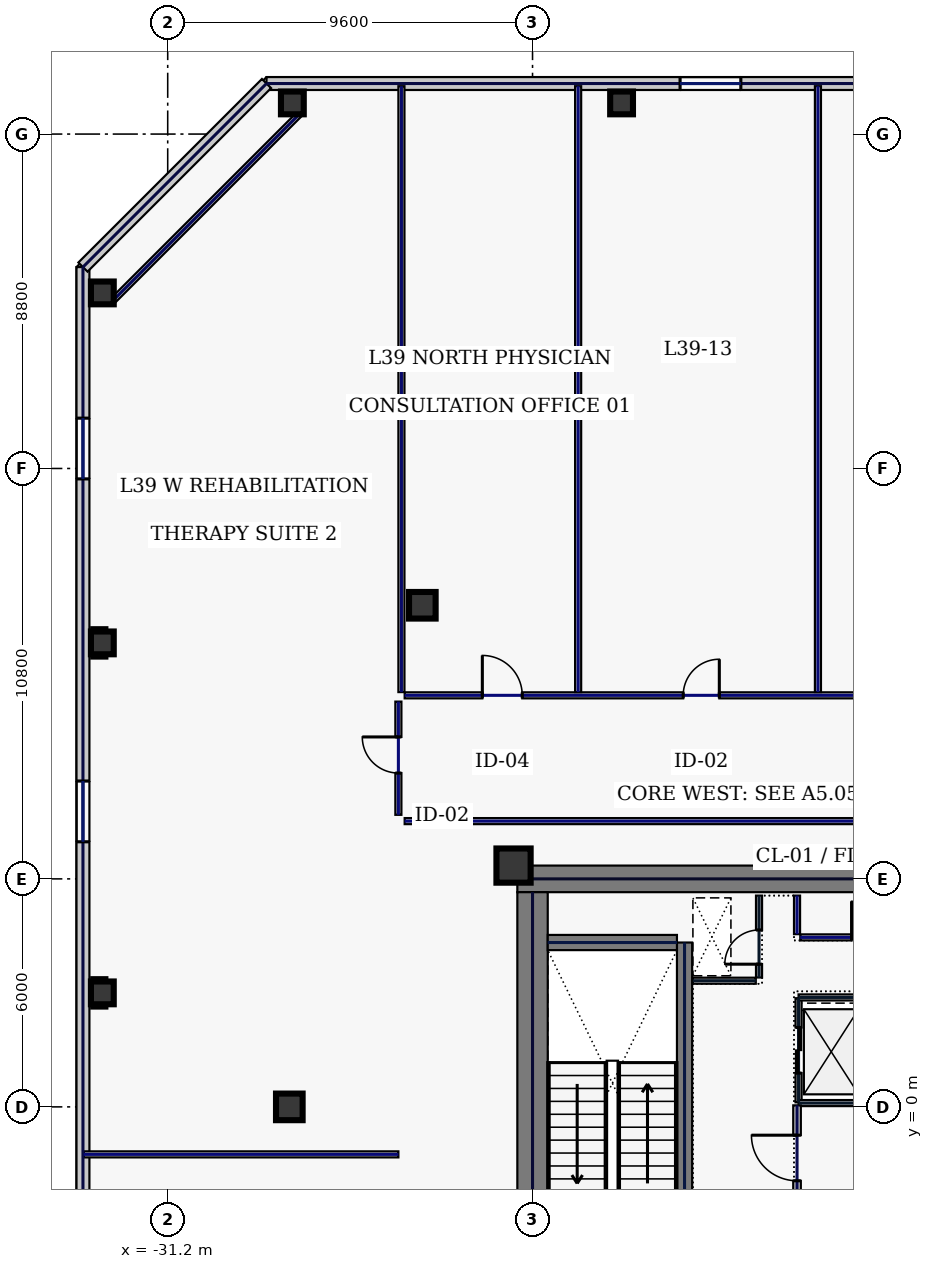
"""IFC4 building model, lengths in metres.
Left out: names, types, materials, properties, quantities, classifications, styles, units other than length and angle.
Written with IfcOpenShell. Run it as: python <this file> out.ifc"""

import sys

from ifc_helpers import new_model, si_unit, direction, frame, frame_2d, origin, origin_2d, place, context, subcontext, project, spatial, rectangle, hollow_rectangle, extrude, element, fill, save


model = new_model("IFC4")
c1 = context("Model", 3, precision=1e-05, world=origin(), true_north=direction((0.0, 1.0)))
c2 = subcontext(c1, "Body", "Model", "MODEL_VIEW")
j1 = project(units=[si_unit("LENGTHUNIT", "METRE"), si_unit("PLANEANGLEUNIT", "RADIAN")], contexts=[c1])
p1 = place(None, origin())
s1 = spatial("IfcSite", under=j1, at=p1, CompositionType="ELEMENT")
p2 = place(p1, origin())
s2 = spatial("IfcBuilding", under=s1, at=p2, CompositionType="ELEMENT")
p3 = place(p2, frame((0.0, 0.0, 172.2)))
s3 = spatial("IfcBuildingStorey", under=s2, at=p3, CompositionType="ELEMENT", Elevation=172.2)
p4 = place(p3, frame((-22.0, 6.0, 0.0), z_axis=(0.0, 0.0, 1.0), x_axis=(1.0, 0.0, 0.0)))
e1 = element("IfcWall", 1, at=p4, inside=s3, PredefinedType="SHEAR", context=c2, shape_type="SweptSolid", body=[
    extrude(rectangle(XDim=11.55, YDim=0.7, at=frame_2d((5.775, 0.0))), origin(), (0.0, 0.0, 1.0), 3.74),
])
p5 = place(p3, frame((-21.6, -5.65, 0.0), z_axis=(0.0, 0.0, 1.0), x_axis=(0.0, 1.0, 0.0)))
e2 = element("IfcWall", 2, at=p5, inside=s3, PredefinedType="SHEAR", context=c2, shape_type="SweptSolid", body=[
    extrude(rectangle(XDim=11.3, YDim=0.8, at=frame_2d((5.65, 0.0))), origin(), (0.0, 0.0, 1.0), 3.74),
])
p6 = place(p3, frame((-17.6, -4.325, 0.0), z_axis=(0.0, 0.0, 1.0), x_axis=(0.0, 1.0, 0.0)))
e3 = element("IfcWall", 3, at=p6, inside=s3, PredefinedType="SHEAR", context=c2, shape_type="SweptSolid", body=[
    extrude(rectangle(XDim=8.65, YDim=0.4, at=frame_2d((4.325, 0.0))), origin(), (0.0, 0.0, 1.0), 3.74),
])
p7 = place(p6, frame((0.25, 0.0, 0.0)))
e4 = element("IfcOpeningElement", 4, at=p7, cuts=e3, PredefinedType="OPENING", context=c2, shape_type="SweptSolid", body=[
    extrude(rectangle(XDim=1.1, YDim=2.2, at=frame_2d((0.55, 1.1))), frame((0.0, 0.21, 0.0), z_axis=(0.0, -1.0, 0.0), x_axis=(1.0, 0.0, 0.0)), (0.0, 0.0, 1.0), 0.42),
])
p8 = place(p3, frame((-21.2, 4.325, 0.0), z_axis=(0.0, 0.0, 1.0), x_axis=(1.0, 0.0, 0.0)))
e5 = element("IfcWall", 5, at=p8, inside=s3, PredefinedType="SHEAR", context=c2, shape_type="SweptSolid", body=[
    extrude(rectangle(XDim=3.4, YDim=0.4, at=frame_2d((1.7, 0.0))), origin(), (0.0, 0.0, 1.0), 3.74),
])
p9 = place(p3, frame((-22.1, 6.35, 0.0), z_axis=(0.0, 0.0, 1.0), x_axis=(1.0, 0.0, 0.0)))
e6 = element("IfcColumn", 6, at=p9, inside=s3, PredefinedType="COLUMN", context=c2, shape_type="SweptSolid", body=[
    extrude(hollow_rectangle(XDim=0.9, YDim=0.9, WallThickness=0.04, at=origin_2d()), origin(), (0.0, 0.0, 1.0), 3.74),
])
for number, where, z_axis, x_axis in (
    (7, (-24.5, 13.2, 0.0), (0.0, 0.0, 1.0), (1.0, 0.0, 0.0)),
    (8, (-28.0, 0.0, 0.0), (0.0, 0.0, 1.0), (1.0, 0.0, 0.0)),
):
    element("IfcColumn", number, at=place(p3, frame(where, z_axis=z_axis, x_axis=x_axis)), inside=s3, PredefinedType="COLUMN", context=c2, shape_type="SweptSolid", body=[
        extrude(hollow_rectangle(XDim=0.7, YDim=0.7, WallThickness=0.032, at=origin_2d()), origin(), (0.0, 0.0, 1.0), 3.74),
    ])
for number, where, z_axis, x_axis in (
    (9, (-19.257, 26.42, 0.0), (0.0, 0.0, 1.0), (1.0, 0.0, 0.0)),
    (10, (-27.92, 26.42, 0.0), (0.0, 0.0, 1.0), (1.0, 0.0, 0.0)),
    (11, (-32.92, 21.42, 0.0), (0.0, 0.0, 1.0), (1.0, 0.0, 0.0)),
    (12, (-32.92, 12.21, 0.0), (0.0, 0.0, 1.0), (1.0, 0.0, 0.0)),
    (13, (-32.92, 3.0, 0.0), (0.0, 0.0, 1.0), (1.0, 0.0, 0.0)),
):
    element("IfcColumn", number, at=place(p3, frame(where, z_axis=z_axis, x_axis=x_axis)), inside=s3, PredefinedType="COLUMN", context=c2, shape_type="SweptSolid", body=[
        extrude(hollow_rectangle(XDim=0.6, YDim=0.6, WallThickness=0.028, at=origin_2d()), origin(), (0.0, 0.0, 1.0), 3.74),
    ])
p10 = place(p3, frame((-8.663, 26.93, 0.0), z_axis=(0.0, 0.0, 1.0), x_axis=(-1.0, 0.0, 0.0)))
e14 = element("IfcWall", 14, at=p10, inside=s3, PredefinedType="STANDARD", context=c2, shape_type="SweptSolid", body=[
    extrude(rectangle(XDim=19.937, YDim=0.34, at=frame_2d((9.969, 0.0))), origin(), (0.0, 0.0, 1.0), 3.74),
])
p11 = place(p10, frame((7.455, 0.0, 0.22)))
e15 = element("IfcOpeningElement", 15, at=p11, cuts=e14, PredefinedType="OPENING", context=c2, shape_type="SweptSolid", body=[
    extrude(rectangle(XDim=1.6, YDim=1.2, at=frame_2d((0.8, 0.6))), frame((0.0, 0.18, 0.0), z_axis=(0.0, -1.0, 0.0), x_axis=(1.0, 0.0, 0.0)), (0.0, 0.0, 1.0), 0.36),
])
p12 = place(p3, frame((-33.43, 22.1, 0.0), z_axis=(0.0, 0.0, 1.0), x_axis=(0.0, -1.0, 0.0)))
e16 = element("IfcWall", 16, at=p12, inside=s3, PredefinedType="STANDARD", context=c2, shape_type="SweptSolid", body=[
    extrude(rectangle(XDim=38.2, YDim=0.34, at=frame_2d((19.1, 0.0))), origin(), (0.0, 0.0, 1.0), 3.74),
])
p13 = place(p12, frame((3.975, 0.0, 0.22)))
e17 = element("IfcOpeningElement", 17, at=p13, cuts=e16, PredefinedType="OPENING", context=c2, shape_type="SweptSolid", body=[
    extrude(rectangle(XDim=1.6, YDim=1.2, at=frame_2d((0.8, 0.6))), frame((0.0, 0.18, 0.0), z_axis=(0.0, -1.0, 0.0), x_axis=(1.0, 0.0, 0.0)), (0.0, 0.0, 1.0), 0.36),
])
p14 = place(p12, frame((13.525, 0.0, 0.22)))
e18 = element("IfcOpeningElement", 18, at=p14, cuts=e16, PredefinedType="OPENING", context=c2, shape_type="SweptSolid", body=[
    extrude(rectangle(XDim=1.6, YDim=1.2, at=frame_2d((0.8, 0.6))), frame((0.0, 0.18, 0.0), z_axis=(0.0, -1.0, 0.0), x_axis=(1.0, 0.0, 0.0)), (0.0, 0.0, 1.0), 0.36),
])
p15 = place(p12, frame((32.625, 0.0, 0.22)))
e19 = element("IfcOpeningElement", 19, at=p15, cuts=e16, PredefinedType="OPENING", context=c2, shape_type="SweptSolid", body=[
    extrude(rectangle(XDim=1.6, YDim=1.2, at=frame_2d((0.8, 0.6))), frame((0.0, 0.18, 0.0), z_axis=(0.0, -1.0, 0.0), x_axis=(1.0, 0.0, 0.0)), (0.0, 0.0, 1.0), 0.36),
])
p16 = place(p3, frame((-28.6, 26.93, 0.0), z_axis=(0.0, 0.0, 1.0), x_axis=(-0.707106781187, -0.707106781187, 0.0)))
e20 = element("IfcWall", 20, at=p16, inside=s3, PredefinedType="STANDARD", context=c2, shape_type="SweptSolid", body=[
    extrude(rectangle(XDim=6.83, YDim=0.34, at=frame_2d((3.415, 0.0))), origin(), (0.0, 0.0, 1.0), 3.74),
])
p17 = place(p3, frame((-14.6, 0.12, 0.0), z_axis=(0.0, 0.0, 1.0), x_axis=(0.0, 1.0, 0.0)))
e21 = element("IfcWall", 21, at=p17, inside=s3, PredefinedType="PARTITIONING", context=c2, shape_type="SweptSolid", body=[
    extrude(rectangle(XDim=2.74, YDim=0.16, at=frame_2d((1.37, 0.0))), origin(), (0.0, 0.0, 1.0), 3.74),
])
p18 = place(p17, frame((0.77, 0.0, 0.0)))
e22 = element("IfcOpeningElement", 22, at=p18, cuts=e21, PredefinedType="OPENING", context=c2, shape_type="SweptSolid", body=[
    extrude(rectangle(XDim=1.2, YDim=2.2, at=frame_2d((0.6, 1.1))), frame((0.0, 0.09, 0.0), z_axis=(0.0, -1.0, 0.0), x_axis=(1.0, 0.0, 0.0)), (0.0, 0.0, 1.0), 0.18),
])
for number, where, z_axis, x_axis in (
    (23, (-14.6, 0.1, 0.0), (0.0, 0.0, 1.0), (1.0, 0.0, 0.0)),
    (24, (-14.6, 2.88, 0.0), (0.0, 0.0, 1.0), (1.0, 0.0, 0.0)),
):
    element("IfcWall", number, at=place(p3, frame(where, z_axis=z_axis, x_axis=x_axis)), inside=s3, PredefinedType="PARTITIONING", context=c2, shape_type="SweptSolid", body=[
        extrude(rectangle(XDim=1.76, YDim=0.16, at=frame_2d((0.88, 0.0))), origin(), (0.0, 0.0, 1.0), 3.74),
    ])
p19 = place(p3, frame((-15.64, 3.405, 0.0), z_axis=(0.0, 0.0, 1.0), x_axis=(0.0, 1.0, 0.0)))
e25 = element("IfcWall", 25, at=p19, inside=s3, PredefinedType="PARTITIONING", context=c2, shape_type="SweptSolid", body=[
    extrude(rectangle(XDim=2.155, YDim=0.16, at=frame_2d((1.078, 0.0))), origin(), (0.0, 0.0, 1.0), 3.74),
])
p20 = place(p19, frame((0.35, 0.0, 0.0)))
e26 = element("IfcOpeningElement", 26, at=p20, cuts=e25, PredefinedType="OPENING", context=c2, shape_type="SweptSolid", body=[
    extrude(rectangle(XDim=0.9, YDim=2.2, at=frame_2d((0.45, 1.1))), frame((0.0, 0.09, 0.0), z_axis=(0.0, -1.0, 0.0), x_axis=(1.0, 0.0, 0.0)), (0.0, 0.0, 1.0), 0.18),
])
p21 = place(p3, frame((-17.38, 3.32, 0.0), z_axis=(0.0, 0.0, 1.0), x_axis=(1.0, 0.0, 0.0)))
e27 = element("IfcWall", 27, at=p21, inside=s3, PredefinedType="PARTITIONING", context=c2, shape_type="SweptSolid", body=[
    extrude(rectangle(XDim=1.655, YDim=0.16, at=frame_2d((0.827, 0.0))), origin(), (0.0, 0.0, 1.0), 3.74),
])
p22 = place(p3, frame((-14.555, 4.46, 0.0), z_axis=(0.0, 0.0, 1.0), x_axis=(1.0, 0.0, 0.0)))
e28 = element("IfcWall", 28, at=p22, inside=s3, PredefinedType="PARTITIONING", context=c2, shape_type="SweptSolid", body=[
    extrude(rectangle(XDim=3.755, YDim=0.16, at=frame_2d((1.877, 0.0))), origin(), (0.0, 0.0, 1.0), 3.74),
])
p23 = place(p22, frame((1.35, 0.0, 0.0)))
e29 = element("IfcOpeningElement", 29, at=p23, cuts=e28, PredefinedType="OPENING", context=c2, shape_type="SweptSolid", body=[
    extrude(rectangle(XDim=0.95, YDim=2.2, at=frame_2d((0.475, 1.1))), frame((0.0, 0.09, 0.0), z_axis=(0.0, -1.0, 0.0), x_axis=(1.0, 0.0, 0.0)), (0.0, 0.0, 1.0), 0.18),
])
p24 = place(p3, frame((-14.64, 4.545, 0.0), z_axis=(0.0, 0.0, 1.0), x_axis=(0.0, 1.0, 0.0)))
e30 = element("IfcWall", 30, at=p24, inside=s3, PredefinedType="PARTITIONING", context=c2, shape_type="SweptSolid", body=[
    extrude(rectangle(XDim=1.015, YDim=0.16, at=frame_2d((0.508, 0.0))), origin(), (0.0, 0.0, 1.0), 3.74),
])
p25 = place(p3, frame((-14.64, -4.035, 0.0), z_axis=(0.0, 0.0, 1.0), x_axis=(0.0, 1.0, 0.0)))
e31 = element("IfcWall", 31, at=p25, inside=s3, PredefinedType="SOLIDWALL", context=c2, shape_type="SweptSolid", body=[
    extrude(rectangle(XDim=4.075, YDim=0.2, at=frame_2d((2.038, 0.0))), origin(), (0.0, 0.0, 1.0), 3.74),
])
p26 = place(p25, frame((2.09, 0.0, 0.0)))
e32 = element("IfcOpeningElement", 32, at=p26, cuts=e31, PredefinedType="OPENING", context=c2, shape_type="SweptSolid", body=[
    extrude(rectangle(XDim=1.2, YDim=2.2, at=frame_2d((0.6, 1.1))), frame((0.0, 0.11, 0.0), z_axis=(0.0, -1.0, 0.0), x_axis=(1.0, 0.0, 0.0)), (0.0, 0.0, 1.0), 0.22),
])
p27 = place(p3, frame((-27.68, 26.18, 0.0), z_axis=(0.0, 0.0, 1.0), x_axis=(-0.707106781187, -0.707106781187, 0.0)))
e33 = element("IfcWall", 33, at=p27, inside=s3, PredefinedType="PARTITIONING", context=c2, shape_type="SweptSolid", body=[
    extrude(rectangle(XDim=7.071, YDim=0.16, at=frame_2d((3.536, 0.0))), origin(), (0.0, 0.0, 1.0), 1.535),
])
p28 = place(p3, frame((-10.715, 7.52, 0.0), z_axis=(0.0, 0.0, 1.0), x_axis=(-1.0, 0.0, 0.0)))
e34 = element("IfcWall", 34, at=p28, inside=s3, PredefinedType="PARTITIONING", context=c2, shape_type="SweptSolid", body=[
    extrude(rectangle(XDim=14.25, YDim=0.16, at=frame_2d((7.125, 0.0))), origin(), (0.0, 0.0, 1.0), 3.74),
])
p29 = place(p3, frame((-25.13, 7.685, 0.0), z_axis=(0.0, 0.0, 1.0), x_axis=(0.0, 1.0, 0.0)))
e35 = element("IfcWall", 35, at=p29, inside=s3, PredefinedType="PARTITIONING", context=c2, shape_type="SweptSolid", body=[
    extrude(rectangle(XDim=2.98, YDim=0.16, at=frame_2d((1.49, 0.0))), origin(), (0.0, 0.0, 1.0), 3.74),
])
p30 = place(p29, frame((1.1, 0.0, 0.0)))
e36 = element("IfcOpeningElement", 36, at=p30, cuts=e35, PredefinedType="OPENING", context=c2, shape_type="SweptSolid", body=[
    extrude(rectangle(XDim=0.95, YDim=2.2, at=frame_2d((0.475, 1.1))), frame((0.0, 0.09, 0.0), z_axis=(0.0, -1.0, 0.0), x_axis=(1.0, 0.0, 0.0)), (0.0, 0.0, 1.0), 0.18),
])
p31 = place(p3, frame((-24.965, 10.83, 0.0), z_axis=(0.0, 0.0, 1.0), x_axis=(1.0, 0.0, 0.0)))
e37 = element("IfcWall", 37, at=p31, inside=s3, PredefinedType="PARTITIONING", context=c2, shape_type="SweptSolid", body=[
    extrude(rectangle(XDim=49.93, YDim=0.16, at=frame_2d((24.965, 0.0))), origin(), (0.0, 0.0, 1.0), 3.74),
])
p32 = place(p31, frame((2.044, 0.0, 0.0)))
e38 = element("IfcOpeningElement", 38, at=p32, cuts=e37, PredefinedType="OPENING", context=c2, shape_type="SweptSolid", body=[
    extrude(rectangle(XDim=1.05, YDim=2.2, at=frame_2d((0.525, 1.1))), frame((0.0, 0.09, 0.0), z_axis=(0.0, -1.0, 0.0), x_axis=(1.0, 0.0, 0.0)), (0.0, 0.0, 1.0), 0.18),
])
p33 = place(p31, frame((7.33, 0.0, 0.0)))
e39 = element("IfcOpeningElement", 39, at=p33, cuts=e37, PredefinedType="OPENING", context=c2, shape_type="SweptSolid", body=[
    extrude(rectangle(XDim=0.95, YDim=2.2, at=frame_2d((0.475, 1.1))), frame((0.0, 0.09, 0.0), z_axis=(0.0, -1.0, 0.0), x_axis=(1.0, 0.0, 0.0)), (0.0, 0.0, 1.0), 0.18),
])
p34 = place(p31, frame((12.43, 0.0, 0.0)))
e40 = element("IfcOpeningElement", 40, at=p34, cuts=e37, PredefinedType="OPENING", context=c2, shape_type="SweptSolid", body=[
    extrude(rectangle(XDim=0.95, YDim=2.2, at=frame_2d((0.475, 1.1))), frame((0.0, 0.09, 0.0), z_axis=(0.0, -1.0, 0.0), x_axis=(1.0, 0.0, 0.0)), (0.0, 0.0, 1.0), 0.18),
])
p35 = place(p31, frame((18.875, 0.0, 0.0)))
e41 = element("IfcOpeningElement", 41, at=p35, cuts=e37, PredefinedType="OPENING", context=c2, shape_type="SweptSolid", body=[
    extrude(rectangle(XDim=1.3, YDim=2.2, at=frame_2d((0.65, 1.1))), frame((0.0, 0.09, 0.0), z_axis=(0.0, -1.0, 0.0), x_axis=(1.0, 0.0, 0.0)), (0.0, 0.0, 1.0), 0.18),
])
p36 = place(p31, frame((27.225, 0.0, 0.0)))
e42 = element("IfcOpeningElement", 42, at=p36, cuts=e37, PredefinedType="OPENING", context=c2, shape_type="SweptSolid", body=[
    extrude(rectangle(XDim=0.95, YDim=2.2, at=frame_2d((0.475, 1.1))), frame((0.0, 0.09, 0.0), z_axis=(0.0, -1.0, 0.0), x_axis=(1.0, 0.0, 0.0)), (0.0, 0.0, 1.0), 0.18),
])
p37 = place(p31, frame((33.153, 0.0, 0.0)))
e43 = element("IfcOpeningElement", 43, at=p37, cuts=e37, PredefinedType="OPENING", context=c2, shape_type="SweptSolid", body=[
    extrude(rectangle(XDim=1.05, YDim=2.2, at=frame_2d((0.525, 1.1))), frame((0.0, 0.09, 0.0), z_axis=(0.0, -1.0, 0.0), x_axis=(1.0, 0.0, 0.0)), (0.0, 0.0, 1.0), 0.18),
])
p38 = place(p31, frame((38.637, 0.0, 0.0)))
e44 = element("IfcOpeningElement", 44, at=p38, cuts=e37, PredefinedType="OPENING", context=c2, shape_type="SweptSolid", body=[
    extrude(rectangle(XDim=1.15, YDim=2.2, at=frame_2d((0.575, 1.1))), frame((0.0, 0.09, 0.0), z_axis=(0.0, -1.0, 0.0), x_axis=(1.0, 0.0, 0.0)), (0.0, 0.0, 1.0), 0.18),
])
p39 = place(p31, frame((42.8, 0.0, 0.0)))
e45 = element("IfcOpeningElement", 45, at=p39, cuts=e37, PredefinedType="OPENING", context=c2, shape_type="SweptSolid", body=[
    extrude(rectangle(XDim=1.3, YDim=2.2, at=frame_2d((0.65, 1.1))), frame((0.0, 0.09, 0.0), z_axis=(0.0, -1.0, 0.0), x_axis=(1.0, 0.0, 0.0)), (0.0, 0.0, 1.0), 0.18),
])
p40 = place(p31, frame((47.106, 0.0, 0.0)))
e46 = element("IfcOpeningElement", 46, at=p40, cuts=e37, PredefinedType="OPENING", context=c2, shape_type="SweptSolid", body=[
    extrude(rectangle(XDim=0.95, YDim=2.2, at=frame_2d((0.475, 1.1))), frame((0.0, 0.09, 0.0), z_axis=(0.0, -1.0, 0.0), x_axis=(1.0, 0.0, 0.0)), (0.0, 0.0, 1.0), 0.18),
])
p41 = place(p3, frame((-25.05, 10.915, 0.0), z_axis=(0.0, 0.0, 1.0), x_axis=(0.0, 1.0, 0.0)))
e47 = element("IfcWall", 47, at=p41, inside=s3, PredefinedType="PARTITIONING", context=c2, shape_type="SweptSolid", body=[
    extrude(rectangle(XDim=15.945, YDim=0.16, at=frame_2d((7.973, 0.0))), origin(), (0.0, 0.0, 1.0), 3.285),
])
for number, where, z_axis, x_axis in (
    (48, (-20.4, 10.915, 0.0), (0.0, 0.0, 1.0), (0.0, 1.0, 0.0)),
    (49, (-14.09, 10.915, 0.0), (0.0, 0.0, 1.0), (0.0, 1.0, 0.0)),
):
    element("IfcWall", number, at=place(p3, frame(where, z_axis=z_axis, x_axis=x_axis)), inside=s3, PredefinedType="PARTITIONING", context=c2, shape_type="SweptSolid", body=[
        extrude(rectangle(XDim=15.945, YDim=0.16, at=frame_2d((7.973, 0.0))), origin(), (0.0, 0.0, 1.0), 3.74),
    ])
p42 = place(p3, frame((-33.41, -1.25, 0.0), z_axis=(0.0, 0.0, 1.0), x_axis=(1.0, 0.0, 0.0)))
e50 = element("IfcWall", 50, at=p42, inside=s3, PredefinedType="PARTITIONING", context=c2, shape_type="SweptSolid", body=[
    extrude(rectangle(XDim=8.28, YDim=0.16, at=frame_2d((4.14, 0.0))), origin(), (0.0, 0.0, 1.0), 3.74),
])
p43 = place(p11, origin())
e51 = element("IfcWindow", 51, at=p43, inside=s3, PartitioningType="SINGLE_PANEL", PredefinedType="WINDOW", context=c2, shape_type="SweptSolid", body=[
    extrude(rectangle(XDim=1.6, YDim=1.2, at=frame_2d((0.8, 0.6))), frame((0.0, 0.03, 0.0), z_axis=(0.0, -1.0, 0.0), x_axis=(1.0, 0.0, 0.0)), (0.0, 0.0, 1.0), 0.06),
])
fill(e15, e51)
p44 = place(p13, origin())
e52 = element("IfcWindow", 52, at=p44, inside=s3, PartitioningType="SINGLE_PANEL", PredefinedType="WINDOW", context=c2, shape_type="SweptSolid", body=[
    extrude(rectangle(XDim=1.6, YDim=1.2, at=frame_2d((0.8, 0.6))), frame((0.0, 0.03, 0.0), z_axis=(0.0, -1.0, 0.0), x_axis=(1.0, 0.0, 0.0)), (0.0, 0.0, 1.0), 0.06),
])
fill(e17, e52)
p45 = place(p14, origin())
e53 = element("IfcWindow", 53, at=p45, inside=s3, PartitioningType="SINGLE_PANEL", PredefinedType="WINDOW", context=c2, shape_type="SweptSolid", body=[
    extrude(rectangle(XDim=1.6, YDim=1.2, at=frame_2d((0.8, 0.6))), frame((0.0, 0.03, 0.0), z_axis=(0.0, -1.0, 0.0), x_axis=(1.0, 0.0, 0.0)), (0.0, 0.0, 1.0), 0.06),
])
fill(e18, e53)
p46 = place(p18, origin())
e54 = element("IfcDoor", 54, at=p46, inside=s3, OperationType="SLIDING_TO_LEFT", PredefinedType="DOOR", context=c2, shape_type="SweptSolid", body=[
    extrude(rectangle(XDim=1.2, YDim=2.2, at=frame_2d((0.6, 1.1))), frame((0.0, 0.025, 0.0), z_axis=(0.0, -1.0, 0.0), x_axis=(1.0, 0.0, 0.0)), (0.0, 0.0, 1.0), 0.05),
])
fill(e22, e54)
p47 = place(p20, origin())
e55 = element("IfcDoor", 55, at=p47, inside=s3, OperationType="SINGLE_SWING_LEFT", PredefinedType="DOOR", context=c2, shape_type="SweptSolid", body=[
    extrude(rectangle(XDim=0.9, YDim=2.2, at=frame_2d((0.45, 1.1))), frame((0.0, 0.025, 0.0), z_axis=(0.0, -1.0, 0.0), x_axis=(1.0, 0.0, 0.0)), (0.0, 0.0, 1.0), 0.05),
])
fill(e26, e55)
p48 = place(p23, origin())
e56 = element("IfcDoor", 56, at=p48, inside=s3, OperationType="SINGLE_SWING_LEFT", PredefinedType="DOOR", context=c2, shape_type="SweptSolid", body=[
    extrude(rectangle(XDim=0.95, YDim=2.2, at=frame_2d((0.475, 1.1))), frame((0.0, 0.025, 0.0), z_axis=(0.0, -1.0, 0.0), x_axis=(1.0, 0.0, 0.0)), (0.0, 0.0, 1.0), 0.05),
])
fill(e29, e56)
p49 = place(p26, origin())
e57 = element("IfcDoor", 57, at=p49, inside=s3, OperationType="SINGLE_SWING_RIGHT", PredefinedType="DOOR", context=c2, shape_type="SweptSolid", body=[
    extrude(rectangle(XDim=1.2, YDim=2.2, at=frame_2d((0.6, 1.1))), frame((0.0, 0.025, 0.0), z_axis=(0.0, -1.0, 0.0), x_axis=(1.0, 0.0, 0.0)), (0.0, 0.0, 1.0), 0.05),
])
fill(e32, e57)
p50 = place(p32, origin())
e58 = element("IfcDoor", 58, at=p50, inside=s3, OperationType="SINGLE_SWING_LEFT", PredefinedType="DOOR", context=c2, shape_type="SweptSolid", body=[
    extrude(rectangle(XDim=1.05, YDim=2.2, at=frame_2d((0.525, 1.1))), frame((0.0, 0.025, 0.0), z_axis=(0.0, -1.0, 0.0), x_axis=(1.0, 0.0, 0.0)), (0.0, 0.0, 1.0), 0.05),
])
fill(e38, e58)
p51 = place(p33, origin())
e59 = element("IfcDoor", 59, at=p51, inside=s3, OperationType="SINGLE_SWING_RIGHT", PredefinedType="DOOR", context=c2, shape_type="SweptSolid", body=[
    extrude(rectangle(XDim=0.95, YDim=2.2, at=frame_2d((0.475, 1.1))), frame((0.0, 0.025, 0.0), z_axis=(0.0, -1.0, 0.0), x_axis=(1.0, 0.0, 0.0)), (0.0, 0.0, 1.0), 0.05),
])
fill(e39, e59)
p52 = place(p30, origin())
e60 = element("IfcDoor", 60, at=p52, inside=s3, OperationType="SINGLE_SWING_RIGHT", PredefinedType="DOOR", context=c2, shape_type="SweptSolid", body=[
    extrude(rectangle(XDim=0.95, YDim=2.2, at=frame_2d((0.475, 1.1))), frame((0.0, 0.025, 0.0), z_axis=(0.0, -1.0, 0.0), x_axis=(1.0, 0.0, 0.0)), (0.0, 0.0, 1.0), 0.05),
])
fill(e36, e60)
save(model, sys.argv[1])
